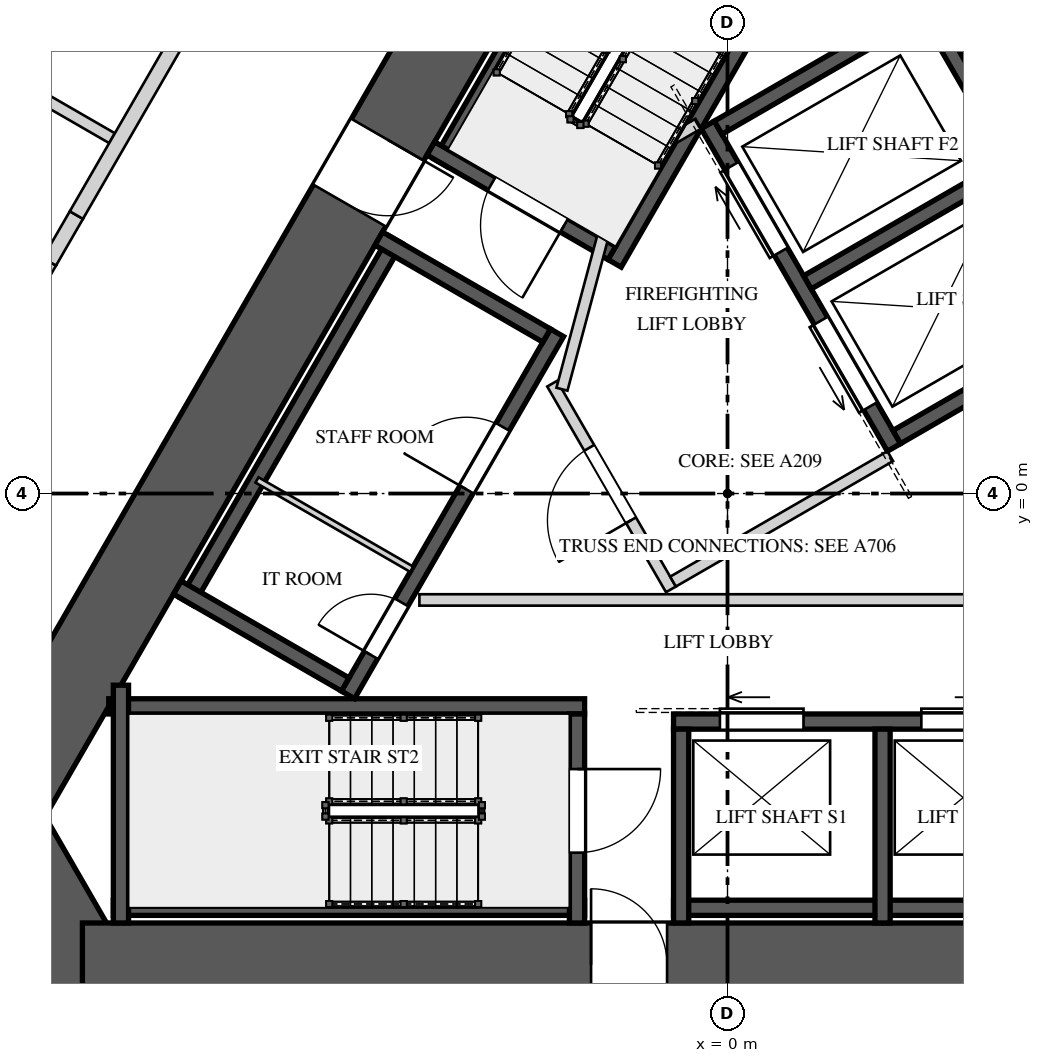
"""IFC4 building model, lengths in metres.
Left out: names, types, materials, properties, quantities, classifications, styles, units other than length and angle.
Written with IfcOpenShell. Run it as: python <this file> out.ifc"""

import sys

from ifc_helpers import new_model, si_unit, direction, frame, frame_2d, origin, place, context, subcontext, project, spatial, rectangle, extrude, element, fill, save


model = new_model("IFC4")
c1 = context("Model", 3, precision=1e-05, world=origin(), true_north=direction((0.0, 1.0)))
c2 = subcontext(c1, "Body", "Model", "MODEL_VIEW")
j1 = project(units=[si_unit("LENGTHUNIT", "METRE"), si_unit("PLANEANGLEUNIT", "RADIAN")], contexts=[c1])
p1 = place(None, origin())
s1 = spatial("IfcSite", under=j1, at=p1, CompositionType="ELEMENT")
p2 = place(p1, origin())
s2 = spatial("IfcBuilding", under=s1, at=p2, CompositionType="ELEMENT")
p3 = place(p2, frame((0.0, 0.0, 46.0)))
s3 = spatial("IfcBuildingStorey", under=s2, at=p3, CompositionType="ELEMENT", Elevation=46.0)
p4 = place(p3, frame((-1.126, 10.45, 0.0), z_axis=(0.0, 0.0, 1.0), x_axis=(-0.500001757713, -0.866024388966, 0.0)))
e1 = element("IfcWall", 1, at=p4, inside=s3, PredefinedType="SHEAR", context=c2, shape_type="SweptSolid", body=[
    extrude(rectangle(XDim=16.974, YDim=1.1, at=frame_2d((8.487, 0.0))), origin(), (0.0, 0.0, 1.0), 5.2),
])
p5 = place(p4, frame((6.692, 0.0, 0.0)))
e2 = element("IfcOpeningElement", 2, at=p5, cuts=e1, PredefinedType="OPENING", context=c2, shape_type="SweptSolid", body=[
    extrude(rectangle(XDim=1.0, YDim=2.4, at=frame_2d((0.5, 1.2))), frame((0.0, 0.56, 0.0), z_axis=(0.0, -1.0, 0.0), x_axis=(1.0, 0.0, 0.0)), (0.0, 0.0, 1.0), 1.12),
])
p6 = place(p3, frame((-9.772, -3.975, 0.0), z_axis=(0.0, 0.0, 1.0), x_axis=(0.499995765644, -0.866027848477, 0.0)))
e3 = element("IfcWall", 3, at=p6, inside=s3, PredefinedType="SHEAR", context=c2, shape_type="SweptSolid", body=[
    extrude(rectangle(XDim=2.887, YDim=1.1, at=frame_2d((1.443, 0.0))), origin(), (0.0, 0.0, 1.0), 5.2),
])
p7 = place(p3, frame((-8.487, -6.2, 0.0), z_axis=(0.0, 0.0, 1.0), x_axis=(1.0, 0.0, 0.0)))
e4 = element("IfcWall", 4, at=p7, inside=s3, PredefinedType="SHEAR", context=c2, shape_type="SweptSolid", body=[
    extrude(rectangle(XDim=16.974, YDim=1.1, at=frame_2d((8.487, 0.0))), origin(), (0.0, 0.0, 1.0), 5.2),
])
p8 = place(p7, frame((6.692, 0.0, 0.0)))
e5 = element("IfcOpeningElement", 5, at=p8, cuts=e4, PredefinedType="OPENING", context=c2, shape_type="SweptSolid", body=[
    extrude(rectangle(XDim=1.0, YDim=2.4, at=frame_2d((0.5, 1.2))), frame((0.0, 0.56, 0.0), z_axis=(0.0, -1.0, 0.0), x_axis=(1.0, 0.0, 0.0)), (0.0, 0.0, 1.0), 1.12),
])
p9 = place(p7, frame((14.397, 0.0, 0.0)))
e6 = element("IfcOpeningElement", 6, at=p9, cuts=e4, PredefinedType="OPENING", context=c2, shape_type="SweptSolid", body=[
    extrude(rectangle(XDim=0.8, YDim=2.1, at=frame_2d((0.4, 1.05))), frame((0.0, 0.56, 0.0), z_axis=(0.0, -1.0, 0.0), x_axis=(1.0, 0.0, 0.0)), (0.0, 0.0, 1.0), 1.12),
])
p10 = place(p3, frame((9.613, -4.25, 0.0), z_axis=(0.0, 0.0, 1.0), x_axis=(-0.500001757713, 0.866024388966, 0.0)))
e7 = element("IfcWall", 7, at=p10, inside=s3, PredefinedType="SHEAR", context=c2, shape_type="SweptSolid", body=[
    extrude(rectangle(XDim=16.974, YDim=1.1, at=frame_2d((8.487, 0.0))), origin(), (0.0, 0.0, 1.0), 5.2),
])
p11 = place(p10, frame((6.762, 0.0, 0.0)))
e8 = element("IfcOpeningElement", 8, at=p11, cuts=e7, PredefinedType="OPENING", context=c2, shape_type="SweptSolid", body=[
    extrude(rectangle(XDim=1.0, YDim=2.4, at=frame_2d((0.5, 1.2))), frame((0.0, 0.56, 0.0), z_axis=(0.0, -1.0, 0.0), x_axis=(1.0, 0.0, 0.0)), (0.0, 0.0, 1.0), 1.12),
])
p12 = place(p10, frame((13.889, 0.0, 0.0)))
e9 = element("IfcOpeningElement", 9, at=p12, cuts=e7, PredefinedType="OPENING", context=c2, shape_type="SweptSolid", body=[
    extrude(rectangle(XDim=0.8, YDim=2.1, at=frame_2d((0.4, 1.05))), frame((0.0, 0.56, 0.0), z_axis=(0.0, -1.0, 0.0), x_axis=(1.0, 0.0, 0.0)), (0.0, 0.0, 1.0), 1.12),
])
p13 = place(p3, frame((-0.68, 9.722, 0.0), z_axis=(0.0, 0.0, 1.0), x_axis=(-0.49998037582, -0.866036733513, 0.0)))
e10 = element("IfcWall", 10, at=p13, inside=s3, PredefinedType="SOLIDWALL", context=c2, shape_type="SweptSolid", body=[
    extrude(rectangle(XDim=6.2, YDim=0.2, at=frame_2d((3.1, 0.0))), origin(), (0.0, 0.0, 1.0), 4.85),
])
p14 = place(p3, frame((1.646, 8.45, 0.0), z_axis=(0.0, 0.0, 1.0), x_axis=(-0.500006002103, -0.866021938441, 0.0)))
e11 = element("IfcWall", 11, at=p14, inside=s3, PredefinedType="SOLIDWALL", context=c2, shape_type="SweptSolid", body=[
    extrude(rectangle(XDim=6.261, YDim=0.2, at=frame_2d((3.13, 0.0))), origin(), (0.0, 0.0, 1.0), 4.85),
])
p15 = place(p3, frame((-1.521, 3.165, 0.0), z_axis=(0.0, 0.0, 1.0), x_axis=(-0.866027397988, 0.499996545922, 0.0)))
e12 = element("IfcWall", 12, at=p15, inside=s3, PredefinedType="SOLIDWALL", context=c2, shape_type="SweptSolid", body=[
    extrude(rectangle(XDim=2.75, YDim=0.2, at=frame_2d((1.375, 0.0))), origin(), (0.0, 0.0, 1.0), 4.85),
])
p16 = place(p15, frame((0.725, 0.0, 0.0)))
e13 = element("IfcOpeningElement", 13, at=p16, cuts=e12, PredefinedType="OPENING", context=c2, shape_type="SweptSolid", body=[
    extrude(rectangle(XDim=1.1, YDim=2.4, at=frame_2d((0.55, 1.2))), frame((0.0, 0.11, 0.0), z_axis=(0.0, -1.0, 0.0), x_axis=(1.0, 0.0, 0.0)), (0.0, 0.0, 1.0), 0.22),
])
p17 = place(p3, frame((-8.08, -5.45, 0.0), z_axis=(0.0, 0.0, 1.0), x_axis=(1.0, 0.0, 0.0)))
e14 = element("IfcWall", 14, at=p17, inside=s3, PredefinedType="SOLIDWALL", context=c2, shape_type="SweptSolid", body=[
    extrude(rectangle(XDim=6.2, YDim=0.2, at=frame_2d((3.1, 0.0))), origin(), (0.0, 0.0, 1.0), 4.85),
])
p18 = place(p3, frame((-8.141, -2.8, 0.0), z_axis=(0.0, 0.0, 1.0), x_axis=(1.0, 0.0, 0.0)))
e15 = element("IfcWall", 15, at=p18, inside=s3, PredefinedType="SOLIDWALL", context=c2, shape_type="SweptSolid", body=[
    extrude(rectangle(XDim=6.261, YDim=0.2, at=frame_2d((3.13, 0.0))), origin(), (0.0, 0.0, 1.0), 4.85),
])
p19 = place(p3, frame((-7.98, -2.522, 0.0), z_axis=(0.0, 0.0, 1.0), x_axis=(0.0, -1.0, 0.0)))
e16 = element("IfcWall", 16, at=p19, inside=s3, PredefinedType="SOLIDWALL", context=c2, shape_type="SweptSolid", body=[
    extrude(rectangle(XDim=3.128, YDim=0.2, at=frame_2d((1.564, 0.0))), origin(), (0.0, 0.0, 1.0), 4.85),
])
p20 = place(p3, frame((-1.98, -2.9, 0.0), z_axis=(0.0, 0.0, 1.0), x_axis=(0.0, -1.0, 0.0)))
e17 = element("IfcWall", 17, at=p20, inside=s3, PredefinedType="SOLIDWALL", context=c2, shape_type="SweptSolid", body=[
    extrude(rectangle(XDim=2.75, YDim=0.2, at=frame_2d((1.375, 0.0))), origin(), (0.0, 0.0, 1.0), 4.85),
])
p21 = place(p20, frame((0.725, 0.0, 0.0)))
e18 = element("IfcOpeningElement", 18, at=p21, cuts=e17, PredefinedType="OPENING", context=c2, shape_type="SweptSolid", body=[
    extrude(rectangle(XDim=1.1, YDim=2.4, at=frame_2d((0.55, 1.2))), frame((0.0, 0.11, 0.0), z_axis=(0.0, -1.0, 0.0), x_axis=(1.0, 0.0, 0.0)), (0.0, 0.0, 1.0), 0.22),
])
p22 = place(p3, frame((-4.993, -2.648, 0.0), z_axis=(0.0, 0.0, 1.0), x_axis=(0.499996545922, 0.866027397988, 0.0)))
e19 = element("IfcWall", 19, at=p22, inside=s3, PredefinedType="SOLIDWALL", context=c2, shape_type="SweptSolid", body=[
    extrude(rectangle(XDim=5.5, YDim=0.2, at=frame_2d((2.75, 0.0))), origin(), (0.0, 0.0, 1.0), 4.85),
])
p23 = place(p22, frame((3.12, 0.0, 0.0)))
e20 = element("IfcOpeningElement", 20, at=p23, cuts=e19, PredefinedType="OPENING", context=c2, shape_type="SweptSolid", body=[
    extrude(rectangle(XDim=0.95, YDim=2.4, at=frame_2d((0.475, 1.2))), frame((0.0, 0.11, 0.0), z_axis=(0.0, -1.0, 0.0), x_axis=(1.0, 0.0, 0.0)), (0.0, 0.0, 1.0), 0.22),
])
p24 = place(p22, frame((0.605, 0.0, 0.0)))
e21 = element("IfcOpeningElement", 21, at=p24, cuts=e19, PredefinedType="OPENING", context=c2, shape_type="SweptSolid", body=[
    extrude(rectangle(XDim=0.8, YDim=2.1, at=frame_2d((0.4, 1.05))), frame((0.0, 0.11, 0.0), z_axis=(0.0, -1.0, 0.0), x_axis=(1.0, 0.0, 0.0)), (0.0, 0.0, 1.0), 0.22),
])
p25 = place(p3, frame((-4.365, 3.34, 0.0), z_axis=(0.0, 0.0, 1.0), x_axis=(-0.499996545922, -0.866027397988, 0.0)))
e22 = element("IfcWall", 22, at=p25, inside=s3, PredefinedType="SOLIDWALL", context=c2, shape_type="SweptSolid", body=[
    extrude(rectangle(XDim=5.5, YDim=0.2, at=frame_2d((2.75, 0.0))), origin(), (0.0, 0.0, 1.0), 4.85),
])
for number, where, z_axis, x_axis in (
    (23, (-2.38, 2.078, 0.0), (0.0, 0.0, 1.0), (-0.866, 0.5, 0.0)),
    (24, (-5.03, -2.512, 0.0), (0.0, 0.0, 1.0), (-0.866, 0.5, 0.0)),
):
    element("IfcWall", number, at=place(p3, frame(where, z_axis=z_axis, x_axis=x_axis)), inside=s3, PredefinedType="SOLIDWALL", context=c2, shape_type="SweptSolid", body=[
        extrude(rectangle(XDim=2.55, YDim=0.2, at=frame_2d((1.275, 0.0))), origin(), (0.0, 0.0, 1.0), 4.85),
    ])
p26 = place(p3, frame((-4.155, -0.996, 0.0), z_axis=(0.0, 0.0, 1.0), x_axis=(-0.866016039709, 0.500016218704, 0.0)))
e25 = element("IfcWall", 25, at=p26, inside=s3, PredefinedType="PARTITIONING", context=c2, shape_type="SweptSolid", body=[
    extrude(rectangle(XDim=2.35, YDim=0.08, at=frame_2d((1.175, 0.0))), origin(), (0.0, 0.0, 1.0), 4.85),
])
p27 = place(p3, frame((-0.71, -3.0, 0.0), z_axis=(0.0, 0.0, 1.0), x_axis=(1.0, 0.0, 0.0)))
e26 = element("IfcWall", 26, at=p27, inside=s3, PredefinedType="SOLIDWALL", context=c2, shape_type="SweptSolid", body=[
    extrude(rectangle(XDim=5.5, YDim=0.2, at=frame_2d((2.75, 0.0))), origin(), (0.0, 0.0, 1.0), 4.85),
])
p28 = place(p27, frame((0.61, 0.0, 0.0)))
e27 = element("IfcOpeningElement", 27, at=p28, cuts=e26, PredefinedType="OPENING", context=c2, shape_type="SweptSolid", body=[
    extrude(rectangle(XDim=1.1, YDim=2.1, at=frame_2d((0.55, 1.05))), frame((0.0, 0.11, 0.0), z_axis=(0.0, -1.0, 0.0), x_axis=(1.0, 0.0, 0.0)), (0.0, 0.0, 1.0), 0.22),
])
p29 = place(p27, frame((3.26, 0.0, 0.0)))
e28 = element("IfcOpeningElement", 28, at=p29, cuts=e26, PredefinedType="OPENING", context=c2, shape_type="SweptSolid", body=[
    extrude(rectangle(XDim=1.1, YDim=2.1, at=frame_2d((0.55, 1.05))), frame((0.0, 0.11, 0.0), z_axis=(0.0, -1.0, 0.0), x_axis=(1.0, 0.0, 0.0)), (0.0, 0.0, 1.0), 0.22),
])
p30 = place(p3, frame((-0.71, -5.45, 0.0), z_axis=(0.0, 0.0, 1.0), x_axis=(1.0, 0.0, 0.0)))
e29 = element("IfcWall", 29, at=p30, inside=s3, PredefinedType="SOLIDWALL", context=c2, shape_type="SweptSolid", body=[
    extrude(rectangle(XDim=5.5, YDim=0.2, at=frame_2d((2.75, 0.0))), origin(), (0.0, 0.0, 1.0), 4.85),
])
for number, where, z_axis, x_axis in (
    (30, (-0.61, -3.1, 0.0), (0.0, 0.0, 1.0), (0.0, -1.0, 0.0)),
    (31, (2.04, -3.1, 0.0), (0.0, 0.0, 1.0), (0.0, -1.0, 0.0)),
):
    element("IfcWall", number, at=place(p3, frame(where, z_axis=z_axis, x_axis=x_axis)), inside=s3, PredefinedType="SOLIDWALL", context=c2, shape_type="SweptSolid", body=[
        extrude(rectangle(XDim=2.55, YDim=0.2, at=frame_2d((1.275, 0.0))), origin(), (0.0, 0.0, 1.0), 4.85),
    ])
p31 = place(p3, frame((2.19, 0.606, 0.0), z_axis=(0.0, 0.0, 1.0), x_axis=(-0.500002801628, 0.866023786258, 0.0)))
e32 = element("IfcWall", 32, at=p31, inside=s3, PredefinedType="SOLIDWALL", context=c2, shape_type="SweptSolid", body=[
    extrude(rectangle(XDim=4.9, YDim=0.2, at=frame_2d((2.45, 0.0))), origin(), (0.0, 0.0, 1.0), 4.85),
])
p32 = place(p31, frame((0.625, 0.0, 0.0)))
e33 = element("IfcOpeningElement", 33, at=p32, cuts=e32, PredefinedType="OPENING", context=c2, shape_type="SweptSolid", body=[
    extrude(rectangle(XDim=1.3, YDim=2.1, at=frame_2d((0.65, 1.05))), frame((0.0, 0.11, 0.0), z_axis=(0.0, -1.0, 0.0), x_axis=(1.0, 0.0, 0.0)), (0.0, 0.0, 1.0), 0.22),
])
p33 = place(p31, frame((2.975, 0.0, 0.0)))
e34 = element("IfcOpeningElement", 34, at=p33, cuts=e32, PredefinedType="OPENING", context=c2, shape_type="SweptSolid", body=[
    extrude(rectangle(XDim=1.3, YDim=2.1, at=frame_2d((0.65, 1.05))), frame((0.0, 0.11, 0.0), z_axis=(0.0, -1.0, 0.0), x_axis=(1.0, 0.0, 0.0)), (0.0, 0.0, 1.0), 0.22),
])
p34 = place(p3, frame((5.005, 2.231, 0.0), z_axis=(0.0, 0.0, 1.0), x_axis=(-0.500002801628, 0.866023786258, 0.0)))
e35 = element("IfcWall", 35, at=p34, inside=s3, PredefinedType="SOLIDWALL", context=c2, shape_type="SweptSolid", body=[
    extrude(rectangle(XDim=4.9, YDim=0.2, at=frame_2d((2.45, 0.0))), origin(), (0.0, 0.0, 1.0), 4.85),
])
p35 = place(p3, frame((2.227, 0.743, 0.0), z_axis=(0.0, 0.0, 1.0), x_axis=(0.866014461049, 0.500018952895, 0.0)))
e36 = element("IfcWall", 36, at=p35, inside=s3, PredefinedType="SOLIDWALL", context=c2, shape_type="SweptSolid", body=[
    extrude(rectangle(XDim=3.35, YDim=0.2, at=frame_2d((1.675, 0.0))), origin(), (0.0, 0.0, 1.0), 4.85),
])
p36 = place(p3, frame((1.052, 2.778, 0.0), z_axis=(0.0, 0.0, 1.0), x_axis=(0.866032680314, 0.499987396469, 0.0)))
e37 = element("IfcWall", 37, at=p36, inside=s3, PredefinedType="SOLIDWALL", context=c2, shape_type="SweptSolid", body=[
    extrude(rectangle(XDim=3.35, YDim=0.2, at=frame_2d((1.675, 0.0))), origin(), (0.0, 0.0, 1.0), 4.85),
])
p37 = place(p3, frame((-0.123, 4.813, 0.0), z_axis=(0.0, 0.0, 1.0), x_axis=(0.866014461049, 0.500018952895, 0.0)))
e38 = element("IfcWall", 38, at=p37, inside=s3, PredefinedType="SOLIDWALL", context=c2, shape_type="SweptSolid", body=[
    extrude(rectangle(XDim=3.35, YDim=0.2, at=frame_2d((1.675, 0.0))), origin(), (0.0, 0.0, 1.0), 4.85),
])
p38 = place(p3, frame((-0.744, -1.261, 0.0), z_axis=(0.0, 0.0, 1.0), x_axis=(-0.500004234368, 0.866022959057, 0.0)))
e39 = element("IfcWall", 39, at=p38, inside=s3, PredefinedType="PARTITIONING", context=c2, shape_type="SweptSolid", body=[
    extrude(rectangle(XDim=3.125, YDim=0.15, at=frame_2d((1.562, 0.0))), origin(), (0.0, 0.0, 1.0), 4.85),
])
p39 = place(p38, frame((1.05, 0.0, 0.0)))
e40 = element("IfcOpeningElement", 40, at=p39, cuts=e39, PredefinedType="OPENING", context=c2, shape_type="SweptSolid", body=[
    extrude(rectangle(XDim=1.1, YDim=2.4, at=frame_2d((0.55, 1.2))), frame((0.0, 0.085, 0.0), z_axis=(0.0, -1.0, 0.0), x_axis=(1.0, 0.0, 0.0)), (0.0, 0.0, 1.0), 0.17),
])
p40 = place(p3, frame((-0.717, -1.159, 0.0), z_axis=(0.0, 0.0, 1.0), x_axis=(0.866008176907, 0.50002983664, 0.0)))
e41 = element("IfcWall", 41, at=p40, inside=s3, PredefinedType="PARTITIONING", context=c2, shape_type="SweptSolid", body=[
    extrude(rectangle(XDim=3.3, YDim=0.15, at=frame_2d((1.65, 0.0))), origin(), (0.0, 0.0, 1.0), 4.85),
])
p41 = place(p3, frame((-2.178, 1.372, 0.0), z_axis=(0.0, 0.0, 1.0), x_axis=(0.258808958833, 0.96592852884, 0.0)))
e42 = element("IfcWall", 42, at=p41, inside=s3, PredefinedType="PARTITIONING", context=c2, shape_type="SweptSolid", body=[
    extrude(rectangle(XDim=2.903, YDim=0.15, at=frame_2d((1.451, 0.0))), origin(), (0.0, 0.0, 1.0), 4.85),
])
p42 = place(p3, frame((-1.51, 4.215, 0.0), z_axis=(0.0, 0.0, 1.0), x_axis=(0.866085525409, 0.49989585183, 0.0)))
e43 = element("IfcWall", 43, at=p42, inside=s3, PredefinedType="PARTITIONING", context=c2, shape_type="SweptSolid", body=[
    extrude(rectangle(XDim=1.3, YDim=0.15, at=frame_2d((0.65, 0.0))), origin(), (0.0, 0.0, 1.0), 4.85),
])
p43 = place(p3, frame((-4.053, -1.4, 0.0), z_axis=(0.0, 0.0, 1.0), x_axis=(1.0, 0.0, 0.0)))
e44 = element("IfcWall", 44, at=p43, inside=s3, PredefinedType="PARTITIONING", context=c2, shape_type="SweptSolid", body=[
    extrude(rectangle(XDim=7.876, YDim=0.15, at=frame_2d((3.938, 0.0))), origin(), (0.0, 0.0, 1.0), 4.85),
])
p44 = place(p3, frame((-8.097, 4.675, 0.0), z_axis=(0.0, 0.0, 1.0), x_axis=(-0.866018381195, 0.500012163284, 0.0)))
e45 = element("IfcWall", 45, at=p44, inside=s3, PredefinedType="PARTITIONING", context=c2, shape_type="SweptSolid", body=[
    extrude(rectangle(XDim=8.0, YDim=0.15, at=frame_2d((4.0, 0.0))), origin(), (0.0, 0.0, 1.0), 4.85),
])
p45 = place(p3, frame((-11.049, -0.637, 0.0), z_axis=(0.0, 0.0, 1.0), x_axis=(0.500000470374, 0.866025132214, 0.0)))
e46 = element("IfcWall", 46, at=p45, inside=s3, PredefinedType="SOLIDWALL", context=c2, shape_type="SweptSolid", body=[
    extrude(rectangle(XDim=4.257, YDim=0.2, at=frame_2d((2.128, 0.0))), origin(), (0.0, 0.0, 1.0), 4.85),
])
p46 = place(p45, frame((2.827, 0.0, 0.0)))
e47 = element("IfcOpeningElement", 47, at=p46, cuts=e46, PredefinedType="OPENING", context=c2, shape_type="SweptSolid", body=[
    extrude(rectangle(XDim=1.1, YDim=2.2, at=frame_2d((0.55, 1.1))), frame((0.0, 0.11, 0.0), z_axis=(0.0, -1.0, 0.0), x_axis=(1.0, 0.0, 0.0)), (0.0, 0.0, 1.0), 0.22),
])
p47 = place(p3, frame((-8.92, 3.049, 0.0), z_axis=(0.0, 0.0, 1.0), x_axis=(0.499881507708, 0.866093804534, 0.0)))
e48 = element("IfcWall", 48, at=p47, inside=s3, PredefinedType="SOLIDWALL", context=c2, shape_type="SweptSolid", body=[
    extrude(rectangle(XDim=0.709, YDim=0.2, at=frame_2d((0.354, 0.0))), origin(), (0.0, 0.0, 1.0), 4.15),
])
p48 = place(p3, frame((-8.566, 3.663, 0.0), z_axis=(0.0, 0.0, 1.0), x_axis=(0.500013241293, 0.866017758786, 0.0)))
e49 = element("IfcWall", 49, at=p48, inside=s3, PredefinedType="SOLIDWALL", context=c2, shape_type="SweptSolid", body=[
    extrude(rectangle(XDim=3.585, YDim=0.2, at=frame_2d((1.793, 0.0))), origin(), (0.0, 0.0, 1.0), 4.85),
])
p49 = place(p16, origin())
e50 = element("IfcDoor", 50, at=p49, inside=s3, OperationType="SINGLE_SWING_RIGHT", PredefinedType="DOOR", context=c2, shape_type="SweptSolid", body=[
    extrude(rectangle(XDim=1.1, YDim=2.4, at=frame_2d((0.55, 1.2))), frame((0.0, 0.025, 0.0), z_axis=(0.0, -1.0, 0.0), x_axis=(1.0, 0.0, 0.0)), (0.0, 0.0, 1.0), 0.05),
])
fill(e13, e50)
p50 = place(p21, origin())
e51 = element("IfcDoor", 51, at=p50, inside=s3, OperationType="SINGLE_SWING_LEFT", PredefinedType="DOOR", context=c2, shape_type="SweptSolid", body=[
    extrude(rectangle(XDim=1.1, YDim=2.4, at=frame_2d((0.55, 1.2))), frame((0.0, 0.025, 0.0), z_axis=(0.0, -1.0, 0.0), x_axis=(1.0, 0.0, 0.0)), (0.0, 0.0, 1.0), 0.05),
])
fill(e18, e51)
p51 = place(p23, origin())
e52 = element("IfcDoor", 52, at=p51, inside=s3, OperationType="SINGLE_SWING_LEFT", PredefinedType="DOOR", context=c2, shape_type="SweptSolid", body=[
    extrude(rectangle(XDim=0.95, YDim=2.4, at=frame_2d((0.475, 1.2))), frame((0.0, 0.025, 0.0), z_axis=(0.0, -1.0, 0.0), x_axis=(1.0, 0.0, 0.0)), (0.0, 0.0, 1.0), 0.05),
])
fill(e20, e52)
p52 = place(p24, origin())
e53 = element("IfcDoor", 53, at=p52, inside=s3, OperationType="SINGLE_SWING_RIGHT", PredefinedType="DOOR", context=c2, shape_type="SweptSolid", body=[
    extrude(rectangle(XDim=0.8, YDim=2.1, at=frame_2d((0.4, 1.05))), frame((0.0, 0.025, 0.0), z_axis=(0.0, -1.0, 0.0), x_axis=(1.0, 0.0, 0.0)), (0.0, 0.0, 1.0), 0.05),
])
fill(e21, e53)
p53 = place(p28, origin())
e54 = element("IfcDoor", 54, at=p53, inside=s3, OperationType="SLIDING_TO_LEFT", PredefinedType="DOOR", context=c2, shape_type="SweptSolid", body=[
    extrude(rectangle(XDim=1.1, YDim=2.1, at=frame_2d((0.55, 1.05))), frame((0.0, 0.025, 0.0), z_axis=(0.0, -1.0, 0.0), x_axis=(1.0, 0.0, 0.0)), (0.0, 0.0, 1.0), 0.05),
])
fill(e27, e54)
p54 = place(p29, origin())
e55 = element("IfcDoor", 55, at=p54, inside=s3, OperationType="SLIDING_TO_RIGHT", PredefinedType="DOOR", context=c2, shape_type="SweptSolid", body=[
    extrude(rectangle(XDim=1.1, YDim=2.1, at=frame_2d((0.55, 1.05))), frame((0.0, 0.025, 0.0), z_axis=(0.0, -1.0, 0.0), x_axis=(1.0, 0.0, 0.0)), (0.0, 0.0, 1.0), 0.05),
])
fill(e28, e55)
p55 = place(p32, origin())
e56 = element("IfcDoor", 56, at=p55, inside=s3, OperationType="SLIDING_TO_LEFT", PredefinedType="DOOR", context=c2, shape_type="SweptSolid", body=[
    extrude(rectangle(XDim=1.3, YDim=2.1, at=frame_2d((0.65, 1.05))), frame((0.0, 0.025, 0.0), z_axis=(0.0, -1.0, 0.0), x_axis=(1.0, 0.0, 0.0)), (0.0, 0.0, 1.0), 0.05),
])
fill(e33, e56)
p56 = place(p33, origin())
e57 = element("IfcDoor", 57, at=p56, inside=s3, OperationType="SLIDING_TO_RIGHT", PredefinedType="DOOR", context=c2, shape_type="SweptSolid", body=[
    extrude(rectangle(XDim=1.3, YDim=2.1, at=frame_2d((0.65, 1.05))), frame((0.0, 0.025, 0.0), z_axis=(0.0, -1.0, 0.0), x_axis=(1.0, 0.0, 0.0)), (0.0, 0.0, 1.0), 0.05),
])
fill(e34, e57)
p57 = place(p39, origin())
e58 = element("IfcDoor", 58, at=p57, inside=s3, OperationType="SINGLE_SWING_LEFT", PredefinedType="DOOR", context=c2, shape_type="SweptSolid", body=[
    extrude(rectangle(XDim=1.1, YDim=2.4, at=frame_2d((0.55, 1.2))), frame((0.0, 0.025, 0.0), z_axis=(0.0, -1.0, 0.0), x_axis=(1.0, 0.0, 0.0)), (0.0, 0.0, 1.0), 0.05),
])
fill(e40, e58)
p58 = place(p5, origin())
e59 = element("IfcDoor", 59, at=p58, inside=s3, OperationType="SINGLE_SWING_RIGHT", PredefinedType="DOOR", context=c2, shape_type="SweptSolid", body=[
    extrude(rectangle(XDim=1.0, YDim=2.4, at=frame_2d((0.5, 1.2))), frame((0.0, 0.025, 0.0), z_axis=(0.0, -1.0, 0.0), x_axis=(1.0, 0.0, 0.0)), (0.0, 0.0, 1.0), 0.05),
])
fill(e2, e59)
p59 = place(p8, origin())
e60 = element("IfcDoor", 60, at=p59, inside=s3, OperationType="SINGLE_SWING_LEFT", PredefinedType="DOOR", context=c2, shape_type="SweptSolid", body=[
    extrude(rectangle(XDim=1.0, YDim=2.4, at=frame_2d((0.5, 1.2))), frame((0.0, 0.025, 0.0), z_axis=(0.0, -1.0, 0.0), x_axis=(1.0, 0.0, 0.0)), (0.0, 0.0, 1.0), 0.05),
])
fill(e5, e60)
save(model, sys.argv[1])
